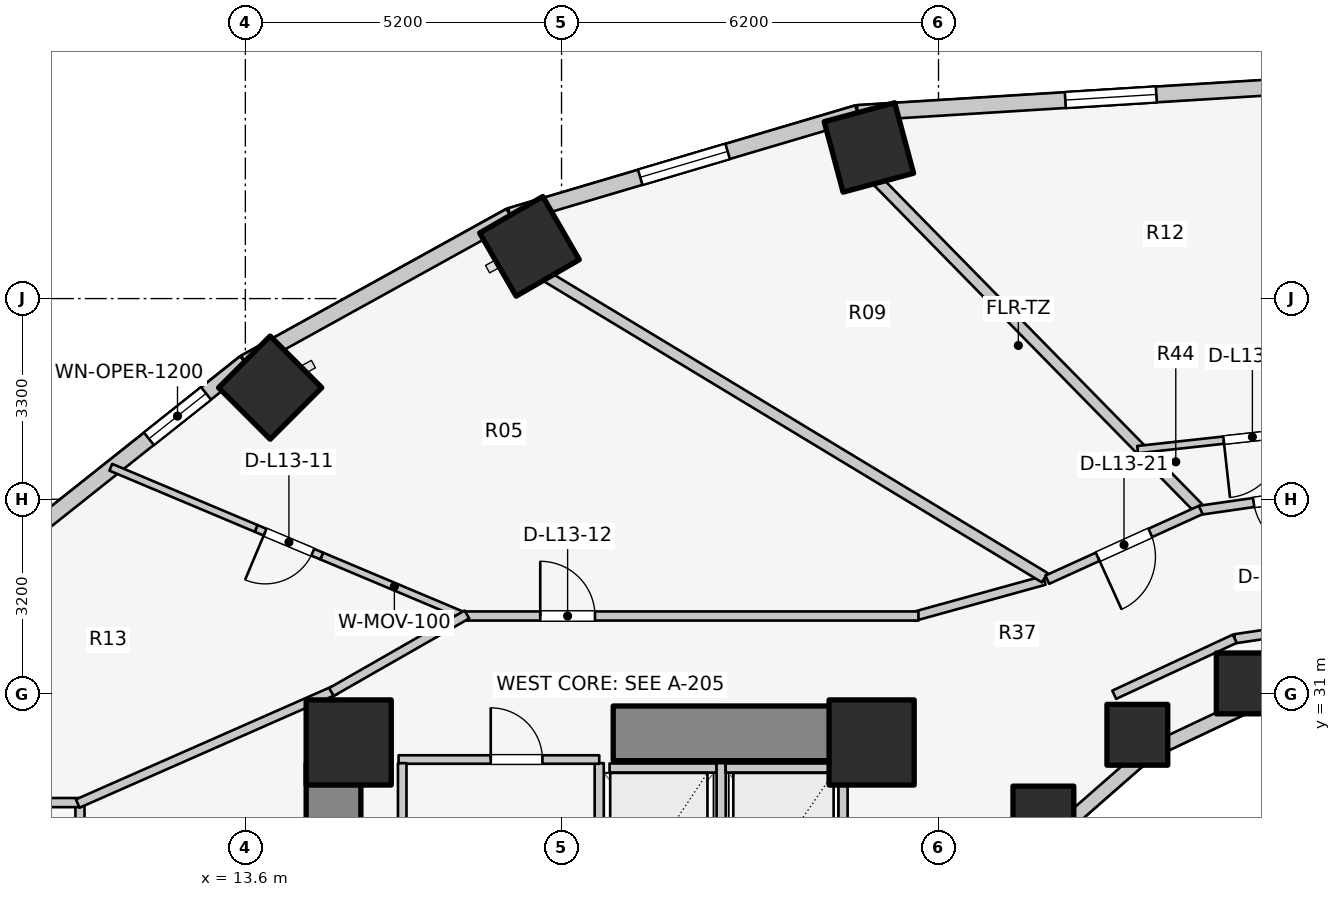
"""IFC4 building model, lengths in metres.
Left out: names, types, materials, properties, quantities, classifications, styles, units other than length and angle.
Written with IfcOpenShell. Run it as: python <this file> out.ifc"""

import sys

from ifc_helpers import new_model, si_unit, direction, frame, frame_2d, origin, origin_2d, place, context, subcontext, project, spatial, rectangle, extrude, element, fill, save


model = new_model("IFC4")
c1 = context("Model", 3, precision=1e-05, world=origin(), true_north=direction((0.0, 1.0)))
c2 = subcontext(c1, "Body", "Model", "MODEL_VIEW")
j1 = project(units=[si_unit("LENGTHUNIT", "METRE"), si_unit("PLANEANGLEUNIT", "RADIAN")], contexts=[c1])
p1 = place(None, origin())
s1 = spatial("IfcSite", under=j1, at=p1, CompositionType="ELEMENT")
p2 = place(p1, origin())
s2 = spatial("IfcBuilding", under=s1, at=p2, CompositionType="ELEMENT")
p3 = place(p2, frame((0.0, 0.0, 46.2)))
s3 = spatial("IfcBuildingStorey", under=s2, at=p3, CompositionType="ELEMENT", Elevation=46.2)
p4 = place(p3, frame((15.05, 17.05, 0.0), z_axis=(0.0, 0.0, 1.0), x_axis=(0.0, 1.0, 0.0)))
e1 = element("IfcWall", 1, at=p4, inside=s3, PredefinedType="SHEAR", context=c2, shape_type="SweptSolid", body=[
    extrude(rectangle(XDim=12.8, YDim=0.9, at=frame_2d((6.4, 0.0))), origin(), (0.0, 0.0, 1.0), 3.1),
])
p5 = place(p3, frame((19.65, 30.35, 0.0), z_axis=(0.0, 0.0, 1.0), x_axis=(1.0, 0.0, 0.0)))
e2 = element("IfcWall", 2, at=p5, inside=s3, PredefinedType="SHEAR", context=c2, shape_type="SweptSolid", body=[
    extrude(rectangle(XDim=4.5, YDim=0.9, at=frame_2d((2.25, 0.0))), origin(), (0.0, 0.0, 1.0), 3.1),
])
for number, where, z_axis, x_axis in (
    (3, (23.9, 30.2, 0.0), (0.0, 0.0, 1.0), (1.0, 0.0, 0.0)),
    (4, (15.3, 30.2, 0.0), (0.0, 0.0, 1.0), (1.0, 0.0, 0.0)),
):
    element("IfcColumn", number, at=place(p3, frame(where, z_axis=z_axis, x_axis=x_axis)), inside=s3, PredefinedType="COLUMN", context=c2, shape_type="SweptSolid", body=[
        extrude(rectangle(XDim=1.4, YDim=1.4, at=origin_2d()), origin(), (0.0, 0.0, 1.0), 3.1),
    ])
p6 = place(p3, frame((30.069, 31.172, 0.0), z_axis=(0.0, 0.0, 1.0), x_axis=(1.0, 0.0, 0.0)))
e5 = element("IfcColumn", 5, at=p6, inside=s3, PredefinedType="COLUMN", context=c2, shape_type="SweptSolid", body=[
    extrude(rectangle(XDim=1.0, YDim=1.0, at=origin_2d()), origin(), (0.0, 0.0, 1.0), 3.1),
])
p7 = place(p3, frame((23.855, 39.986, 0.0), z_axis=(0.0, 0.0, 1.0), x_axis=(-0.258819045103, 0.965925826289, 0.0)))
e6 = element("IfcColumn", 6, at=p7, inside=s3, PredefinedType="COLUMN", context=c2, shape_type="SweptSolid", body=[
    extrude(rectangle(XDim=1.2, YDim=1.2, at=origin_2d()), origin(), (0.0, 0.0, 1.0), 3.1),
])
p8 = place(p3, frame((28.27, 30.327, 0.0), z_axis=(0.0, 0.0, 1.0), x_axis=(1.0, 0.0, 0.0)))
e7 = element("IfcColumn", 7, at=p8, inside=s3, PredefinedType="COLUMN", context=c2, shape_type="SweptSolid", body=[
    extrude(rectangle(XDim=1.0, YDim=1.0, at=origin_2d()), origin(), (0.0, 0.0, 1.0), 3.1),
])
p9 = place(p3, frame((18.273, 38.359, 0.0), z_axis=(0.0, 0.0, 1.0), x_axis=(-0.5, 0.866025403784, 0.0)))
e8 = element("IfcColumn", 8, at=p9, inside=s3, PredefinedType="COLUMN", context=c2, shape_type="SweptSolid", body=[
    extrude(rectangle(XDim=1.2, YDim=1.2, at=origin_2d()), origin(), (0.0, 0.0, 1.0), 3.1),
])
p10 = place(p3, frame((26.725, 28.982, 0.0), z_axis=(0.0, 0.0, 1.0), x_axis=(1.0, 0.0, 0.0)))
e9 = element("IfcColumn", 9, at=p10, inside=s3, PredefinedType="COLUMN", context=c2, shape_type="SweptSolid", body=[
    extrude(rectangle(XDim=1.0, YDim=1.0, at=origin_2d()), origin(), (0.0, 0.0, 1.0), 3.1),
])
p11 = place(p3, frame((14.008, 36.035, 0.0), z_axis=(0.0, 0.0, 1.0), x_axis=(-0.707106781187, 0.707106781187, 0.0)))
e10 = element("IfcColumn", 10, at=p11, inside=s3, PredefinedType="COLUMN", context=c2, shape_type="SweptSolid", body=[
    extrude(rectangle(XDim=1.2, YDim=1.2, at=origin_2d()), origin(), (0.0, 0.0, 1.0), 3.1),
])
p12 = place(p3, frame((32.0, 31.12, 0.0), z_axis=(0.0, 0.0, 1.0), x_axis=(-0.988901730308, -0.148571086668, 0.0)))
e11 = element("IfcWall", 11, at=p12, inside=s3, PredefinedType="STANDARD", context=c2, shape_type="SweptSolid", body=[
    extrude(rectangle(XDim=1.864, YDim=0.23, at=frame_2d((0.932, 0.0))), origin(), (0.0, 0.0, 1.0), 2.16),
])
p13 = place(p3, frame((30.157, 30.843, 0.0), z_axis=(0.0, 0.0, 1.0), x_axis=(-0.904179699603, -0.427152280606, 0.0)))
e12 = element("IfcWall", 12, at=p13, inside=s3, PredefinedType="STANDARD", context=c2, shape_type="SweptSolid", body=[
    extrude(rectangle(XDim=1.899, YDim=0.23, at=frame_2d((0.95, 0.0))), origin(), (0.0, 0.0, 1.0), 2.16),
])
p14 = place(p3, frame((28.44, 30.032, 0.0), z_axis=(0.0, 0.0, 1.0), x_axis=(-0.752576694707, -0.658504607869, 0.0)))
e13 = element("IfcWall", 13, at=p14, inside=s3, PredefinedType="STANDARD", context=c2, shape_type="SweptSolid", body=[
    extrude(rectangle(XDim=1.959, YDim=0.23, at=frame_2d((0.98, 0.0))), origin(), (0.0, 0.0, 1.0), 2.16),
])
p15 = place(p3, frame((32.0, 41.069, 0.0), z_axis=(0.0, 0.0, 1.0), x_axis=(-0.998090514779, -0.061768311519, 0.0)))
e14 = element("IfcWall", 14, at=p15, inside=s3, PredefinedType="STANDARD", context=c2, shape_type="SweptSolid", body=[
    extrude(rectangle(XDim=8.348, YDim=0.26, at=frame_2d((4.174, 0.0))), origin(), (0.0, 0.0, 1.0), 2.85),
])
p16 = place(p15, frame((3.424, 0.0, 0.75)))
e15 = element("IfcOpeningElement", 15, at=p16, cuts=e14, PredefinedType="OPENING", context=c2, shape_type="SweptSolid", body=[
    extrude(rectangle(XDim=1.5, YDim=1.6, at=frame_2d((0.75, 0.8))), frame((0.0, 0.14, 0.0), z_axis=(0.0, -1.0, 0.0), x_axis=(1.0, 0.0, 0.0)), (0.0, 0.0, 1.0), 0.28),
])
p17 = place(p3, frame((23.668, 40.553, 0.0), z_axis=(0.0, 0.0, 1.0), x_axis=(-0.958843593522, -0.283934786811, 0.0)))
e16 = element("IfcWall", 16, at=p17, inside=s3, PredefinedType="STANDARD", context=c2, shape_type="SweptSolid", body=[
    extrude(rectangle(XDim=5.955, YDim=0.26, at=frame_2d((2.978, 0.0))), origin(), (0.0, 0.0, 1.0), 2.85),
])
p18 = place(p17, frame((2.228, 0.0, 0.75)))
e17 = element("IfcOpeningElement", 17, at=p18, cuts=e16, PredefinedType="OPENING", context=c2, shape_type="SweptSolid", body=[
    extrude(rectangle(XDim=1.5, YDim=1.6, at=frame_2d((0.75, 0.8))), frame((0.0, 0.14, 0.0), z_axis=(0.0, -1.0, 0.0), x_axis=(1.0, 0.0, 0.0)), (0.0, 0.0, 1.0), 0.28),
])
p19 = place(p3, frame((17.958, 38.862, 0.0), z_axis=(0.0, 0.0, 1.0), x_axis=(-0.875137303239, -0.483874674352, 0.0)))
e18 = element("IfcWall", 18, at=p19, inside=s3, PredefinedType="STANDARD", context=c2, shape_type="SweptSolid", body=[
    extrude(rectangle(XDim=4.985, YDim=0.26, at=frame_2d((2.493, 0.0))), origin(), (0.0, 0.0, 1.0), 2.85),
])
p20 = place(p3, frame((13.595, 36.45, 0.0), z_axis=(0.0, 0.0, 1.0), x_axis=(-0.783123133379, -0.621866672179, 0.0)))
e19 = element("IfcWall", 19, at=p20, inside=s3, PredefinedType="STANDARD", context=c2, shape_type="SweptSolid", body=[
    extrude(rectangle(XDim=4.839, YDim=0.26, at=frame_2d((2.419, 0.0))), origin(), (0.0, 0.0, 1.0), 2.85),
])
p21 = place(p20, frame((0.819, 0.0, 0.75)))
e20 = element("IfcOpeningElement", 20, at=p21, cuts=e19, PredefinedType="OPENING", context=c2, shape_type="SweptSolid", body=[
    extrude(rectangle(XDim=1.2, YDim=1.5, at=frame_2d((0.6, 0.75))), frame((0.0, 0.14, 0.0), z_axis=(0.0, -1.0, 0.0), x_axis=(1.0, 0.0, 0.0)), (0.0, 0.0, 1.0), 0.28),
])
p22 = place(p3, frame((19.59, 29.78, 0.0), z_axis=(0.0, 0.0, 1.0), x_axis=(1.0, 0.0, 0.0)))
e21 = element("IfcWall", 21, at=p22, inside=s3, PredefinedType="SOLIDWALL", context=c2, shape_type="SweptSolid", body=[
    extrude(rectangle(XDim=1.76, YDim=0.15, at=frame_2d((0.88, 0.0))), origin(), (0.0, 0.0, 1.0), 2.855),
])
for number, where, z_axis, x_axis in (
    (22, (19.42, 27.14, 0.0), (0.0, 0.0, 1.0), (0.0, 1.0, 0.0)),
    (23, (21.425, 27.14, 0.0), (0.0, 0.0, 1.0), (0.0, 1.0, 0.0)),
):
    element("IfcWall", number, at=place(p3, frame(where, z_axis=z_axis, x_axis=x_axis)), inside=s3, PredefinedType="SOLIDWALL", context=c2, shape_type="SweptSolid", body=[
        extrude(rectangle(XDim=2.72, YDim=0.15, at=frame_2d((1.36, 0.0))), origin(), (0.0, 0.0, 1.0), 2.855),
    ])
p23 = place(p3, frame((21.5, 29.78, 0.0), z_axis=(0.0, 0.0, 1.0), x_axis=(1.0, 0.0, 0.0)))
e24 = element("IfcWall", 24, at=p23, inside=s3, PredefinedType="SOLIDWALL", context=c2, shape_type="SweptSolid", body=[
    extrude(rectangle(XDim=1.76, YDim=0.15, at=frame_2d((0.88, 0.0))), origin(), (0.0, 0.0, 1.0), 2.855),
])
p24 = place(p3, frame((23.43, 27.14, 0.0), z_axis=(0.0, 0.0, 1.0), x_axis=(0.0, 1.0, 0.0)))
e25 = element("IfcWall", 25, at=p24, inside=s3, PredefinedType="SOLIDWALL", context=c2, shape_type="SweptSolid", body=[
    extrude(rectangle(XDim=2.72, YDim=0.15, at=frame_2d((1.36, 0.0))), origin(), (0.0, 0.0, 1.0), 2.855),
])
p25 = place(p3, frame((16.12, 29.92, 0.0), z_axis=(0.0, 0.0, 1.0), x_axis=(1.0, 0.0, 0.0)))
e26 = element("IfcWall", 26, at=p25, inside=s3, PredefinedType="PLUMBINGWALL", context=c2, shape_type="SweptSolid", body=[
    extrude(rectangle(XDim=3.3, YDim=0.14, at=frame_2d((1.65, 0.0))), origin(), (0.0, 0.0, 1.0), 2.855),
])
p26 = place(p25, frame((1.516, 0.0, 0.0)))
e27 = element("IfcOpeningElement", 27, at=p26, cuts=e26, PredefinedType="OPENING", context=c2, shape_type="SweptSolid", body=[
    extrude(rectangle(XDim=0.85, YDim=2.05, at=frame_2d((0.425, 1.025))), frame((0.0, 0.08, 0.0), z_axis=(0.0, -1.0, 0.0), x_axis=(1.0, 0.0, 0.0)), (0.0, 0.0, 1.0), 0.16),
])
p27 = place(p3, frame((16.18, 25.98, 0.0), z_axis=(0.0, 0.0, 1.0), x_axis=(0.0, 1.0, 0.0)))
e28 = element("IfcWall", 28, at=p27, inside=s3, PredefinedType="PLUMBINGWALL", context=c2, shape_type="SweptSolid", body=[
    extrude(rectangle(XDim=3.88, YDim=0.14, at=frame_2d((1.94, 0.0))), origin(), (0.0, 0.0, 1.0), 2.855),
])
p28 = place(p3, frame((32.0, 32.22, 0.0), z_axis=(0.0, 0.0, 1.0), x_axis=(-0.989268584896, -0.146108408166, 0.0)))
e29 = element("IfcWall", 29, at=p28, inside=s3, PredefinedType="PARTITIONING", context=c2, shape_type="SweptSolid", body=[
    extrude(rectangle(XDim=2.151, YDim=0.15, at=frame_2d((1.075, 0.0))), origin(), (0.0, 0.0, 1.0), 2.237),
])
p29 = place(p3, frame((29.873, 31.906, 0.0), z_axis=(0.0, 0.0, 1.0), x_axis=(-0.906943449489, -0.421252393975, 0.0)))
e30 = element("IfcWall", 30, at=p29, inside=s3, PredefinedType="PARTITIONING", context=c2, shape_type="SweptSolid", body=[
    extrude(rectangle(XDim=2.186, YDim=0.15, at=frame_2d((1.093, 0.0))), origin(), (0.0, 0.0, 1.0), 2.237),
])
p30 = place(p3, frame((10.88, 16.748, 0.0), z_axis=(0.0, 0.0, 1.0), x_axis=(0.0, 1.0, 0.0)))
e31 = element("IfcWall", 31, at=p30, inside=s3, PredefinedType="PARTITIONING", context=c2, shape_type="SweptSolid", body=[
    extrude(rectangle(XDim=12.503, YDim=0.15, at=frame_2d((6.252, 0.0))), origin(), (0.0, 0.0, 1.0), 2.12),
])
p31 = place(p3, frame((7.014, 29.212, 0.0), z_axis=(0.0, 0.0, 1.0), x_axis=(1.0, 0.0, 0.0)))
e32 = element("IfcWall", 32, at=p31, inside=s3, PredefinedType="PARTITIONING", context=c2, shape_type="SweptSolid", body=[
    extrude(rectangle(XDim=3.866, YDim=0.15, at=frame_2d((1.933, 0.0))), origin(), (0.0, 0.0, 1.0), 2.855),
])
p32 = place(p3, frame((10.844, 29.196, 0.0), z_axis=(0.0, 0.0, 1.0), x_axis=(0.91502756289, 0.403391322604, 0.0)))
e33 = element("IfcWall", 33, at=p32, inside=s3, PredefinedType="PARTITIONING", context=c2, shape_type="SweptSolid", body=[
    extrude(rectangle(XDim=4.637, YDim=0.15, at=frame_2d((2.319, 0.0))), origin(), (0.0, 0.0, 1.0), 2.069),
])
p33 = place(p3, frame((17.246, 32.26, 0.0), z_axis=(0.0, 0.0, 1.0), x_axis=(-0.921672585584, 0.3879686134, 0.0)))
e34 = element("IfcWall", 34, at=p33, inside=s3, PredefinedType="MOVABLE", context=c2, shape_type="SweptSolid", body=[
    extrude(rectangle(XDim=2.593, YDim=0.12, at=frame_2d((1.297, 0.0))), origin(), (0.0, 0.0, 1.0), 2.069),
])
p34 = place(p3, frame((14.856, 33.267, 0.0), z_axis=(0.0, 0.0, 1.0), x_axis=(-0.92176888, 0.387739773384, 0.0)))
e35 = element("IfcWall", 35, at=p34, inside=s3, PredefinedType="MOVABLE", context=c2, shape_type="SweptSolid", body=[
    extrude(rectangle(XDim=1.17, YDim=0.12, at=frame_2d((0.585, 0.0))), origin(), (0.0, 0.0, 1.0), 2.11),
])
p35 = place(p34, frame((0.16, 0.0, 0.0)))
e36 = element("IfcOpeningElement", 36, at=p35, cuts=e35, PredefinedType="OPENING", context=c2, shape_type="SweptSolid", body=[
    extrude(rectangle(XDim=0.85, YDim=2.05, at=frame_2d((0.425, 1.025))), frame((0.0, 0.07, 0.0), z_axis=(0.0, -1.0, 0.0), x_axis=(1.0, 0.0, 0.0)), (0.0, 0.0, 1.0), 0.14),
])
p36 = place(p3, frame((13.778, 33.72, 0.0), z_axis=(0.0, 0.0, 1.0), x_axis=(-0.921706247461, 0.387888635295, 0.0)))
e37 = element("IfcWall", 37, at=p36, inside=s3, PredefinedType="MOVABLE", context=c2, shape_type="SweptSolid", body=[
    extrude(rectangle(XDim=2.593, YDim=0.12, at=frame_2d((1.297, 0.0))), origin(), (0.0, 0.0, 1.0), 2.855),
])
p37 = place(p3, frame((26.742, 32.867, 0.0), z_axis=(0.0, 0.0, 1.0), x_axis=(-0.963833843713, -0.266503886865, 0.0)))
e38 = element("IfcWall", 38, at=p37, inside=s3, PredefinedType="PARTITIONING", context=c2, shape_type="SweptSolid", body=[
    extrude(rectangle(XDim=2.232, YDim=0.15, at=frame_2d((1.116, 0.0))), origin(), (0.0, 0.0, 1.0), 2.237),
])
p38 = place(p3, frame((17.15, 32.28, 0.0), z_axis=(0.0, 0.0, 1.0), x_axis=(1.0, 0.0, 0.0)))
e39 = element("IfcWall", 39, at=p38, inside=s3, PredefinedType="PARTITIONING", context=c2, shape_type="SweptSolid", body=[
    extrude(rectangle(XDim=7.52, YDim=0.15, at=frame_2d((3.76, 0.0))), origin(), (0.0, 0.0, 1.0), 2.237),
])
p39 = place(p38, frame((1.3, 0.0, 0.0)))
e40 = element("IfcOpeningElement", 40, at=p39, cuts=e39, PredefinedType="OPENING", context=c2, shape_type="SweptSolid", body=[
    extrude(rectangle(XDim=0.9, YDim=2.1, at=frame_2d((0.45, 1.05))), frame((0.0, 0.085, 0.0), z_axis=(0.0, -1.0, 0.0), x_axis=(1.0, 0.0, 0.0)), (0.0, 0.0, 1.0), 0.17),
])
p40 = place(p3, frame((17.243, 32.305, 0.0), z_axis=(0.0, 0.0, 1.0), x_axis=(-0.867991349648, -0.496579315857, 0.0)))
e41 = element("IfcWall", 41, at=p40, inside=s3, PredefinedType="PARTITIONING", context=c2, shape_type="SweptSolid", body=[
    extrude(rectangle(XDim=2.567, YDim=0.15, at=frame_2d((1.283, 0.0))), origin(), (0.0, 0.0, 1.0), 2.069),
])
p41 = place(p3, frame((29.267, 34.061, 0.0), z_axis=(0.0, 0.0, 1.0), x_axis=(-0.700234780085, 0.713912636644, 0.0)))
e42 = element("IfcWall", 42, at=p41, inside=s3, PredefinedType="PARTITIONING", context=c2, shape_type="SweptSolid", body=[
    extrude(rectangle(XDim=7.515, YDim=0.18, at=frame_2d((3.757, 0.0))), origin(), (0.0, 0.0, 1.0), 2.237),
])
p42 = place(p3, frame((26.748, 32.91, 0.0), z_axis=(0.0, 0.0, 1.0), x_axis=(-0.855817136021, 0.517278483694, 0.0)))
e43 = element("IfcWall", 43, at=p42, inside=s3, PredefinedType="PARTITIONING", context=c2, shape_type="SweptSolid", body=[
    extrude(rectangle(XDim=9.564, YDim=0.18, at=frame_2d((4.782, 0.0))), origin(), (0.0, 0.0, 1.0), 2.237),
])
p43 = place(p3, frame((32.05, 35.432, 0.0), z_axis=(0.0, 0.0, 1.0), x_axis=(-0.993997647441, -0.109401448263, 0.0)))
e44 = element("IfcWall", 44, at=p43, inside=s3, PredefinedType="MOVABLE", context=c2, shape_type="SweptSolid", body=[
    extrude(rectangle(XDim=3.798, YDim=0.12, at=frame_2d((1.899, 0.0))), origin(), (0.0, 0.0, 1.0), 2.237),
])
p44 = place(p43, frame((1.424, 0.0, 0.0)))
e45 = element("IfcOpeningElement", 45, at=p44, cuts=e44, PredefinedType="OPENING", context=c2, shape_type="SweptSolid", body=[
    extrude(rectangle(XDim=0.95, YDim=2.1, at=frame_2d((0.475, 1.05))), frame((0.0, 0.07, 0.0), z_axis=(0.0, -1.0, 0.0), x_axis=(1.0, 0.0, 0.0)), (0.0, 0.0, 1.0), 0.14),
])
p45 = place(p3, frame((32.007, 34.41, 0.0), z_axis=(0.0, 0.0, 1.0), x_axis=(-0.989748682384, -0.142819976611, 0.0)))
e46 = element("IfcWall", 46, at=p45, inside=s3, PredefinedType="PARTITIONING", context=c2, shape_type="SweptSolid", body=[
    extrude(rectangle(XDim=2.737, YDim=0.15, at=frame_2d((1.368, 0.0))), origin(), (0.0, 0.0, 1.0), 2.237),
])
p46 = place(p45, frame((0.893, 0.0, 0.0)))
e47 = element("IfcOpeningElement", 47, at=p46, cuts=e46, PredefinedType="OPENING", context=c2, shape_type="SweptSolid", body=[
    extrude(rectangle(XDim=0.95, YDim=2.1, at=frame_2d((0.475, 1.05))), frame((0.0, 0.085, 0.0), z_axis=(0.0, -1.0, 0.0), x_axis=(1.0, 0.0, 0.0)), (0.0, 0.0, 1.0), 0.17),
])
p47 = place(p3, frame((29.313, 34.023, 0.0), z_axis=(0.0, 0.0, 1.0), x_axis=(-0.910568469686, -0.41335827319, 0.0)))
e48 = element("IfcWall", 48, at=p47, inside=s3, PredefinedType="PARTITIONING", context=c2, shape_type="SweptSolid", body=[
    extrude(rectangle(XDim=2.772, YDim=0.15, at=frame_2d((1.386, 0.0))), origin(), (0.0, 0.0, 1.0), 2.237),
])
p48 = place(p47, frame((0.911, 0.0, 0.0)))
e49 = element("IfcOpeningElement", 49, at=p48, cuts=e48, PredefinedType="OPENING", context=c2, shape_type="SweptSolid", body=[
    extrude(rectangle(XDim=0.95, YDim=2.1, at=frame_2d((0.475, 1.05))), frame((0.0, 0.085, 0.0), z_axis=(0.0, -1.0, 0.0), x_axis=(1.0, 0.0, 0.0)), (0.0, 0.0, 1.0), 0.17),
])
p49 = place(p16, origin())
e50 = element("IfcWindow", 50, at=p49, inside=s3, PartitioningType="SINGLE_PANEL", PredefinedType="WINDOW", context=c2, shape_type="SweptSolid", body=[
    extrude(rectangle(XDim=1.5, YDim=1.6, at=frame_2d((0.75, 0.8))), frame((0.0, 0.03, 0.0), z_axis=(0.0, -1.0, 0.0), x_axis=(1.0, 0.0, 0.0)), (0.0, 0.0, 1.0), 0.06),
])
fill(e15, e50)
p50 = place(p18, origin())
e51 = element("IfcWindow", 51, at=p50, inside=s3, PartitioningType="SINGLE_PANEL", PredefinedType="WINDOW", context=c2, shape_type="SweptSolid", body=[
    extrude(rectangle(XDim=1.5, YDim=1.6, at=frame_2d((0.75, 0.8))), frame((0.0, 0.03, 0.0), z_axis=(0.0, -1.0, 0.0), x_axis=(1.0, 0.0, 0.0)), (0.0, 0.0, 1.0), 0.06),
])
fill(e17, e51)
p51 = place(p21, origin())
e52 = element("IfcWindow", 52, at=p51, inside=s3, PartitioningType="SINGLE_PANEL", PredefinedType="WINDOW", context=c2, shape_type="SweptSolid", body=[
    extrude(rectangle(XDim=1.2, YDim=1.5, at=frame_2d((0.6, 0.75))), frame((0.0, 0.03, 0.0), z_axis=(0.0, -1.0, 0.0), x_axis=(1.0, 0.0, 0.0)), (0.0, 0.0, 1.0), 0.06),
])
fill(e20, e52)
p52 = place(p26, origin())
e53 = element("IfcDoor", 53, at=p52, inside=s3, OperationType="SINGLE_SWING_LEFT", PredefinedType="DOOR", context=c2, shape_type="SweptSolid", body=[
    extrude(rectangle(XDim=0.85, YDim=2.05, at=frame_2d((0.425, 1.025))), frame((0.0, 0.025, 0.0), z_axis=(0.0, -1.0, 0.0), x_axis=(1.0, 0.0, 0.0)), (0.0, 0.0, 1.0), 0.05),
])
fill(e27, e53)
p53 = place(p35, origin())
e54 = element("IfcDoor", 54, at=p53, inside=s3, OperationType="SINGLE_SWING_RIGHT", PredefinedType="DOOR", context=c2, shape_type="SweptSolid", body=[
    extrude(rectangle(XDim=0.85, YDim=2.05, at=frame_2d((0.425, 1.025))), frame((0.0, 0.025, 0.0), z_axis=(0.0, -1.0, 0.0), x_axis=(1.0, 0.0, 0.0)), (0.0, 0.0, 1.0), 0.05),
])
fill(e36, e54)
p54 = place(p39, origin())
e55 = element("IfcDoor", 55, at=p54, inside=s3, OperationType="SINGLE_SWING_LEFT", PredefinedType="DOOR", context=c2, shape_type="SweptSolid", body=[
    extrude(rectangle(XDim=0.9, YDim=2.1, at=frame_2d((0.45, 1.05))), frame((0.0, 0.025, 0.0), z_axis=(0.0, -1.0, 0.0), x_axis=(1.0, 0.0, 0.0)), (0.0, 0.0, 1.0), 0.05),
])
fill(e40, e55)
p55 = place(p44, origin())
e56 = element("IfcDoor", 56, at=p55, inside=s3, OperationType="SINGLE_SWING_RIGHT", PredefinedType="DOOR", context=c2, shape_type="SweptSolid", body=[
    extrude(rectangle(XDim=0.95, YDim=2.1, at=frame_2d((0.475, 1.05))), frame((0.0, 0.025, 0.0), z_axis=(0.0, -1.0, 0.0), x_axis=(1.0, 0.0, 0.0)), (0.0, 0.0, 1.0), 0.05),
])
fill(e45, e56)
p56 = place(p46, origin())
e57 = element("IfcDoor", 57, at=p56, inside=s3, OperationType="SINGLE_SWING_LEFT", PredefinedType="DOOR", context=c2, shape_type="SweptSolid", body=[
    extrude(rectangle(XDim=0.95, YDim=2.1, at=frame_2d((0.475, 1.05))), frame((0.0, 0.025, 0.0), z_axis=(0.0, -1.0, 0.0), x_axis=(1.0, 0.0, 0.0)), (0.0, 0.0, 1.0), 0.05),
])
fill(e47, e57)
p57 = place(p48, origin())
e58 = element("IfcDoor", 58, at=p57, inside=s3, OperationType="SINGLE_SWING_RIGHT", PredefinedType="DOOR", context=c2, shape_type="SweptSolid", body=[
    extrude(rectangle(XDim=0.95, YDim=2.1, at=frame_2d((0.475, 1.05))), frame((0.0, 0.025, 0.0), z_axis=(0.0, -1.0, 0.0), x_axis=(1.0, 0.0, 0.0)), (0.0, 0.0, 1.0), 0.05),
])
fill(e49, e58)
save(model, sys.argv[1])
